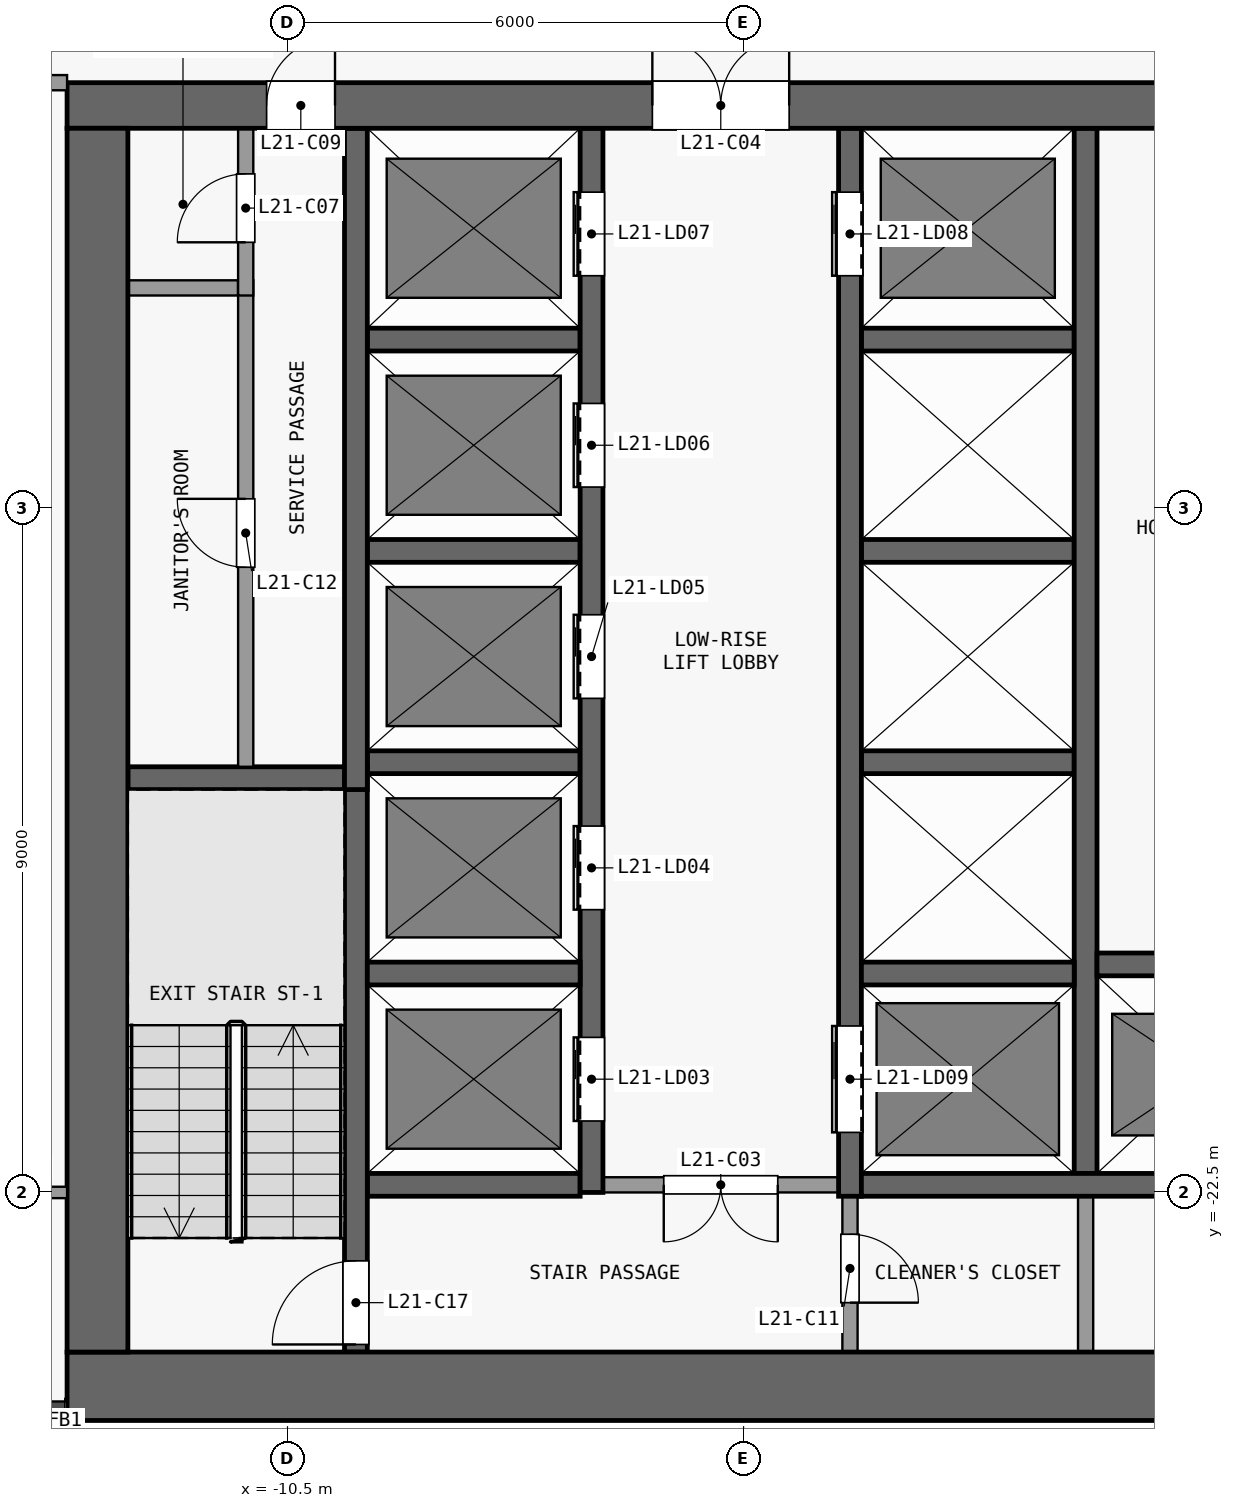
"""IFC4 building model, lengths in metres.
Left out: names, types, materials, properties, quantities, classifications, styles, units other than length and angle.
Written with IfcOpenShell. Run it as: python <this file> out.ifc"""

import sys

from ifc_helpers import new_model, si_unit, direction, frame, frame_2d, origin, place, context, subcontext, project, spatial, rectangle, extrude, element, fill, save


model = new_model("IFC4")
c1 = context("Model", 3, precision=1e-05, world=origin(), true_north=direction((0.0, 1.0)))
c2 = subcontext(c1, "Body", "Model", "MODEL_VIEW")
j1 = project(units=[si_unit("LENGTHUNIT", "METRE"), si_unit("PLANEANGLEUNIT", "RADIAN")], contexts=[c1])
p1 = place(None, origin())
s1 = spatial("IfcSite", under=j1, at=p1, CompositionType="ELEMENT")
p2 = place(p1, origin())
s2 = spatial("IfcBuilding", under=s1, at=p2, CompositionType="ELEMENT")
p3 = place(p2, frame((0.0, 0.0, 88.3)))
s3 = spatial("IfcBuildingStorey", under=s2, at=p3, CompositionType="ELEMENT", Elevation=88.3)
p4 = place(p3, frame((-13.4, -25.05, 0.0), z_axis=(0.0, 0.0, 1.0), x_axis=(1.0, 0.0, 0.0)))
e1 = element("IfcWall", 1, at=p4, inside=s3, PredefinedType="SHEAR", context=c2, shape_type="SweptSolid", body=[
    extrude(rectangle(XDim=26.8, YDim=0.9, at=frame_2d((13.4, 0.0))), origin(), (0.0, 0.0, 1.0), 3.3),
])
p5 = place(p3, frame((-13.4, -8.2, 0.0), z_axis=(0.0, 0.0, 1.0), x_axis=(1.0, 0.0, 0.0)))
e2 = element("IfcWall", 2, at=p5, inside=s3, PredefinedType="SHEAR", context=c2, shape_type="SweptSolid", body=[
    extrude(rectangle(XDim=26.8, YDim=0.6, at=frame_2d((13.4, 0.0))), origin(), (0.0, 0.0, 1.0), 3.3),
])
p6 = place(p5, frame((7.7, 0.0, 0.0)))
e3 = element("IfcOpeningElement", 3, at=p6, cuts=e2, PredefinedType="OPENING", context=c2, shape_type="SweptSolid", body=[
    extrude(rectangle(XDim=1.8, YDim=2.1, at=frame_2d((0.9, 1.05))), frame((0.0, 0.31, 0.0), z_axis=(0.0, -1.0, 0.0), x_axis=(1.0, 0.0, 0.0)), (0.0, 0.0, 1.0), 0.62),
])
p7 = place(p5, frame((17.3, 0.0, 0.0)))
e4 = element("IfcOpeningElement", 4, at=p7, cuts=e2, PredefinedType="OPENING", context=c2, shape_type="SweptSolid", body=[
    extrude(rectangle(XDim=1.8, YDim=2.1, at=frame_2d((0.9, 1.05))), frame((0.0, 0.31, 0.0), z_axis=(0.0, -1.0, 0.0), x_axis=(1.0, 0.0, 0.0)), (0.0, 0.0, 1.0), 0.62),
])
p8 = place(p5, frame((2.625, 0.0, 0.0)))
e5 = element("IfcOpeningElement", 5, at=p8, cuts=e2, PredefinedType="OPENING", context=c2, shape_type="SweptSolid", body=[
    extrude(rectangle(XDim=0.9, YDim=2.1, at=frame_2d((0.45, 1.05))), frame((0.0, 0.31, 0.0), z_axis=(0.0, -1.0, 0.0), x_axis=(1.0, 0.0, 0.0)), (0.0, 0.0, 1.0), 0.62),
])
p9 = place(p5, frame((23.275, 0.0, 0.0)))
e6 = element("IfcOpeningElement", 6, at=p9, cuts=e2, PredefinedType="OPENING", context=c2, shape_type="SweptSolid", body=[
    extrude(rectangle(XDim=0.9, YDim=2.1, at=frame_2d((0.45, 1.05))), frame((0.0, 0.31, 0.0), z_axis=(0.0, -1.0, 0.0), x_axis=(1.0, 0.0, 0.0)), (0.0, 0.0, 1.0), 0.62),
])
p10 = place(p3, frame((-13.0, -24.6, 0.0), z_axis=(0.0, 0.0, 1.0), x_axis=(0.0, 1.0, 0.0)))
e7 = element("IfcWall", 7, at=p10, inside=s3, PredefinedType="SHEAR", context=c2, shape_type="SweptSolid", body=[
    extrude(rectangle(XDim=16.1, YDim=0.8, at=frame_2d((8.05, 0.0))), origin(), (0.0, 0.0, 1.0), 3.3),
])
p11 = place(p3, frame((-9.45, -22.4, 0.0), z_axis=(0.0, 0.0, 1.0), x_axis=(1.0, 0.0, 0.0)))
e8 = element("IfcWall", 8, at=p11, inside=s3, PredefinedType="SHEAR", context=c2, shape_type="SweptSolid", body=[
    extrude(rectangle(XDim=2.8, YDim=0.3, at=frame_2d((1.4, 0.0))), origin(), (0.0, 0.0, 1.0), 3.3),
])
p12 = place(p3, frame((-3.25, -22.4, 0.0), z_axis=(0.0, 0.0, 1.0), x_axis=(-1.0, 0.0, 0.0)))
e9 = element("IfcWall", 9, at=p12, inside=s3, PredefinedType="PARTITIONING", context=c2, shape_type="SweptSolid", body=[
    extrude(rectangle(XDim=3.1, YDim=0.2, at=frame_2d((1.55, 0.0))), origin(), (0.0, 0.0, 1.0), 3.3),
])
p13 = place(p12, frame((0.8, 0.0, 0.0)))
e10 = element("IfcOpeningElement", 10, at=p13, cuts=e9, PredefinedType="OPENING", context=c2, shape_type="SweptSolid", body=[
    extrude(rectangle(XDim=1.5, YDim=2.1, at=frame_2d((0.75, 1.05))), frame((0.0, 0.11, 0.0), z_axis=(0.0, -1.0, 0.0), x_axis=(1.0, 0.0, 0.0)), (0.0, 0.0, 1.0), 0.22),
])
p14 = place(p3, frame((-2.95, -22.4, 0.0), z_axis=(0.0, 0.0, 1.0), x_axis=(1.0, 0.0, 0.0)))
e11 = element("IfcWall", 11, at=p14, inside=s3, PredefinedType="SHEAR", context=c2, shape_type="SweptSolid", body=[
    extrude(rectangle(XDim=6.2, YDim=0.3, at=frame_2d((3.1, 0.0))), origin(), (0.0, 0.0, 1.0), 3.3),
])
for number, where, z_axis, x_axis in (
    (12, (-9.45, -19.62, 0.0), (0.0, 0.0, 1.0), (1.0, 0.0, 0.0)),
    (13, (-2.95, -19.62, 0.0), (0.0, 0.0, 1.0), (1.0, 0.0, 0.0)),
):
    element("IfcWall", number, at=place(p3, frame(where, z_axis=z_axis, x_axis=x_axis)), inside=s3, PredefinedType="SHEAR", context=c2, shape_type="SweptSolid", body=[
        extrude(rectangle(XDim=2.8, YDim=0.3, at=frame_2d((1.4, 0.0))), origin(), (0.0, 0.0, 1.0), 3.3),
    ])
p15 = place(p3, frame((0.15, -19.5, 0.0), z_axis=(0.0, 0.0, 1.0), x_axis=(1.0, 0.0, 0.0)))
e14 = element("IfcWall", 14, at=p15, inside=s3, PredefinedType="SHEAR", context=c2, shape_type="SweptSolid", body=[
    extrude(rectangle(XDim=3.025, YDim=0.3, at=frame_2d((1.513, 0.0))), origin(), (0.0, 0.0, 1.0), 3.3),
])
p16 = place(p3, frame((-12.6, -17.05, 0.0), z_axis=(0.0, 0.0, 1.0), x_axis=(1.0, 0.0, 0.0)))
e15 = element("IfcWall", 15, at=p16, inside=s3, PredefinedType="SHEAR", context=c2, shape_type="SweptSolid", body=[
    extrude(rectangle(XDim=2.85, YDim=0.3, at=frame_2d((1.425, 0.0))), origin(), (0.0, 0.0, 1.0), 3.3),
])
for number, where, z_axis, x_axis in (
    (16, (-9.45, -16.84, 0.0), (0.0, 0.0, 1.0), (1.0, 0.0, 0.0)),
    (17, (-2.95, -16.84, 0.0), (0.0, 0.0, 1.0), (1.0, 0.0, 0.0)),
    (18, (-9.45, -14.06, 0.0), (0.0, 0.0, 1.0), (1.0, 0.0, 0.0)),
    (19, (-2.95, -14.06, 0.0), (0.0, 0.0, 1.0), (1.0, 0.0, 0.0)),
    (20, (-9.45, -11.28, 0.0), (0.0, 0.0, 1.0), (1.0, 0.0, 0.0)),
    (21, (-2.95, -11.28, 0.0), (0.0, 0.0, 1.0), (1.0, 0.0, 0.0)),
):
    element("IfcWall", number, at=place(p3, frame(where, z_axis=z_axis, x_axis=x_axis)), inside=s3, PredefinedType="SHEAR", context=c2, shape_type="SweptSolid", body=[
        extrude(rectangle(XDim=2.8, YDim=0.3, at=frame_2d((1.4, 0.0))), origin(), (0.0, 0.0, 1.0), 3.3),
    ])
p17 = place(p3, frame((-12.6, -10.6, 0.0), z_axis=(0.0, 0.0, 1.0), x_axis=(1.0, 0.0, 0.0)))
e22 = element("IfcWall", 22, at=p17, inside=s3, PredefinedType="PARTITIONING", context=c2, shape_type="SweptSolid", body=[
    extrude(rectangle(XDim=1.45, YDim=0.2, at=frame_2d((0.725, 0.0))), origin(), (0.0, 0.0, 1.0), 3.3),
])
p18 = place(p3, frame((-11.05, -16.9, 0.0), z_axis=(0.0, 0.0, 1.0), x_axis=(0.0, 1.0, 0.0)))
e23 = element("IfcWall", 23, at=p18, inside=s3, PredefinedType="PARTITIONING", context=c2, shape_type="SweptSolid", body=[
    extrude(rectangle(XDim=6.4, YDim=0.2, at=frame_2d((3.2, 0.0))), origin(), (0.0, 0.0, 1.0), 3.3),
])
p19 = place(p18, frame((2.625, 0.0, 0.0)))
e24 = element("IfcOpeningElement", 24, at=p19, cuts=e23, PredefinedType="OPENING", context=c2, shape_type="SweptSolid", body=[
    extrude(rectangle(XDim=0.9, YDim=2.1, at=frame_2d((0.45, 1.05))), frame((0.0, 0.11, 0.0), z_axis=(0.0, -1.0, 0.0), x_axis=(1.0, 0.0, 0.0)), (0.0, 0.0, 1.0), 0.22),
])
p20 = place(p3, frame((-11.05, -10.7, 0.0), z_axis=(0.0, 0.0, 1.0), x_axis=(0.0, 1.0, 0.0)))
e25 = element("IfcWall", 25, at=p20, inside=s3, PredefinedType="PARTITIONING", context=c2, shape_type="SweptSolid", body=[
    extrude(rectangle(XDim=2.2, YDim=0.2, at=frame_2d((1.1, 0.0))), origin(), (0.0, 0.0, 1.0), 3.3),
])
p21 = place(p20, frame((0.7, 0.0, 0.0)))
e26 = element("IfcOpeningElement", 26, at=p21, cuts=e25, PredefinedType="OPENING", context=c2, shape_type="SweptSolid", body=[
    extrude(rectangle(XDim=0.9, YDim=2.1, at=frame_2d((0.45, 1.05))), frame((0.0, 0.11, 0.0), z_axis=(0.0, -1.0, 0.0), x_axis=(1.0, 0.0, 0.0)), (0.0, 0.0, 1.0), 0.22),
])
p22 = place(p3, frame((-9.6, -24.6, 0.0), z_axis=(0.0, 0.0, 1.0), x_axis=(0.0, 1.0, 0.0)))
e27 = element("IfcWall", 27, at=p22, inside=s3, PredefinedType="SHEAR", context=c2, shape_type="SweptSolid", body=[
    extrude(rectangle(XDim=7.7, YDim=0.3, at=frame_2d((3.85, 0.0))), origin(), (0.0, 0.0, 1.0), 3.3),
])
p23 = place(p22, frame((0.1, 0.0, 0.0)))
e28 = element("IfcOpeningElement", 28, at=p23, cuts=e27, PredefinedType="OPENING", context=c2, shape_type="SweptSolid", body=[
    extrude(rectangle(XDim=1.1, YDim=2.1, at=frame_2d((0.55, 1.05))), frame((0.0, 0.16, 0.0), z_axis=(0.0, -1.0, 0.0), x_axis=(1.0, 0.0, 0.0)), (0.0, 0.0, 1.0), 0.32),
])
p24 = place(p3, frame((-9.6, -17.2, 0.0), z_axis=(0.0, 0.0, 1.0), x_axis=(0.0, 1.0, 0.0)))
e29 = element("IfcWall", 29, at=p24, inside=s3, PredefinedType="SHEAR", context=c2, shape_type="SweptSolid", body=[
    extrude(rectangle(XDim=8.7, YDim=0.3, at=frame_2d((4.35, 0.0))), origin(), (0.0, 0.0, 1.0), 3.3),
])
p25 = place(p3, frame((-6.5, -22.5, 0.0), z_axis=(0.0, 0.0, 1.0), x_axis=(0.0, 1.0, 0.0)))
e30 = element("IfcWall", 30, at=p25, inside=s3, PredefinedType="SHEAR", context=c2, shape_type="SweptSolid", body=[
    extrude(rectangle(XDim=14.0, YDim=0.3, at=frame_2d((7.0, 0.0))), origin(), (0.0, 0.0, 1.0), 3.3),
])
p26 = place(p25, frame((0.94, 0.0, 0.0)))
e31 = element("IfcOpeningElement", 31, at=p26, cuts=e30, PredefinedType="OPENING", context=c2, shape_type="SweptSolid", body=[
    extrude(rectangle(XDim=1.1, YDim=2.1, at=frame_2d((0.55, 1.05))), frame((0.0, 0.16, 0.0), z_axis=(0.0, -1.0, 0.0), x_axis=(1.0, 0.0, 0.0)), (0.0, 0.0, 1.0), 0.32),
])
p27 = place(p25, frame((3.72, 0.0, 0.0)))
e32 = element("IfcOpeningElement", 32, at=p27, cuts=e30, PredefinedType="OPENING", context=c2, shape_type="SweptSolid", body=[
    extrude(rectangle(XDim=1.1, YDim=2.1, at=frame_2d((0.55, 1.05))), frame((0.0, 0.16, 0.0), z_axis=(0.0, -1.0, 0.0), x_axis=(1.0, 0.0, 0.0)), (0.0, 0.0, 1.0), 0.32),
])
p28 = place(p25, frame((6.5, 0.0, 0.0)))
e33 = element("IfcOpeningElement", 33, at=p28, cuts=e30, PredefinedType="OPENING", context=c2, shape_type="SweptSolid", body=[
    extrude(rectangle(XDim=1.1, YDim=2.1, at=frame_2d((0.55, 1.05))), frame((0.0, 0.16, 0.0), z_axis=(0.0, -1.0, 0.0), x_axis=(1.0, 0.0, 0.0)), (0.0, 0.0, 1.0), 0.32),
])
p29 = place(p25, frame((9.28, 0.0, 0.0)))
e34 = element("IfcOpeningElement", 34, at=p29, cuts=e30, PredefinedType="OPENING", context=c2, shape_type="SweptSolid", body=[
    extrude(rectangle(XDim=1.1, YDim=2.1, at=frame_2d((0.55, 1.05))), frame((0.0, 0.16, 0.0), z_axis=(0.0, -1.0, 0.0), x_axis=(1.0, 0.0, 0.0)), (0.0, 0.0, 1.0), 0.32),
])
p30 = place(p25, frame((12.06, 0.0, 0.0)))
e35 = element("IfcOpeningElement", 35, at=p30, cuts=e30, PredefinedType="OPENING", context=c2, shape_type="SweptSolid", body=[
    extrude(rectangle(XDim=1.1, YDim=2.1, at=frame_2d((0.55, 1.05))), frame((0.0, 0.16, 0.0), z_axis=(0.0, -1.0, 0.0), x_axis=(1.0, 0.0, 0.0)), (0.0, 0.0, 1.0), 0.32),
])
p31 = place(p3, frame((-3.1, -22.55, 0.0), z_axis=(0.0, 0.0, 1.0), x_axis=(0.0, -1.0, 0.0)))
e36 = element("IfcWall", 36, at=p31, inside=s3, PredefinedType="PARTITIONING", context=c2, shape_type="SweptSolid", body=[
    extrude(rectangle(XDim=2.05, YDim=0.2, at=frame_2d((1.025, 0.0))), origin(), (0.0, 0.0, 1.0), 3.3),
])
p32 = place(p31, frame((0.5, 0.0, 0.0)))
e37 = element("IfcOpeningElement", 37, at=p32, cuts=e36, PredefinedType="OPENING", context=c2, shape_type="SweptSolid", body=[
    extrude(rectangle(XDim=0.9, YDim=2.1, at=frame_2d((0.45, 1.05))), frame((0.0, 0.11, 0.0), z_axis=(0.0, -1.0, 0.0), x_axis=(1.0, 0.0, 0.0)), (0.0, 0.0, 1.0), 0.22),
])
p33 = place(p3, frame((-3.1, -22.55, 0.0), z_axis=(0.0, 0.0, 1.0), x_axis=(0.0, 1.0, 0.0)))
e38 = element("IfcWall", 38, at=p33, inside=s3, PredefinedType="SHEAR", context=c2, shape_type="SweptSolid", body=[
    extrude(rectangle(XDim=14.05, YDim=0.3, at=frame_2d((7.025, 0.0))), origin(), (0.0, 0.0, 1.0), 3.3),
])
p34 = place(p33, frame((12.11, 0.0, 0.0)))
e39 = element("IfcOpeningElement", 39, at=p34, cuts=e38, PredefinedType="OPENING", context=c2, shape_type="SweptSolid", body=[
    extrude(rectangle(XDim=1.1, YDim=2.1, at=frame_2d((0.55, 1.05))), frame((0.0, 0.16, 0.0), z_axis=(0.0, -1.0, 0.0), x_axis=(1.0, 0.0, 0.0)), (0.0, 0.0, 1.0), 0.32),
])
p35 = place(p33, frame((0.84, 0.0, 0.0)))
e40 = element("IfcOpeningElement", 40, at=p35, cuts=e38, PredefinedType="OPENING", context=c2, shape_type="SweptSolid", body=[
    extrude(rectangle(XDim=1.4, YDim=2.1, at=frame_2d((0.7, 1.05))), frame((0.0, 0.16, 0.0), z_axis=(0.0, -1.0, 0.0), x_axis=(1.0, 0.0, 0.0)), (0.0, 0.0, 1.0), 0.32),
])
p36 = place(p3, frame((0.0, -24.6, 0.0), z_axis=(0.0, 0.0, 1.0), x_axis=(0.0, 1.0, 0.0)))
e41 = element("IfcWall", 41, at=p36, inside=s3, PredefinedType="PARTITIONING", context=c2, shape_type="SweptSolid", body=[
    extrude(rectangle(XDim=2.05, YDim=0.2, at=frame_2d((1.025, 0.0))), origin(), (0.0, 0.0, 1.0), 3.3),
])
p37 = place(p3, frame((0.0, -22.25, 0.0), z_axis=(0.0, 0.0, 1.0), x_axis=(0.0, 1.0, 0.0)))
e42 = element("IfcWall", 42, at=p37, inside=s3, PredefinedType="SHEAR", context=c2, shape_type="SweptSolid", body=[
    extrude(rectangle(XDim=13.75, YDim=0.3, at=frame_2d((6.875, 0.0))), origin(), (0.0, 0.0, 1.0), 3.3),
])
p38 = place(p3, frame((-16.325, -22.5, 0.0), z_axis=(0.0, 0.0, 1.0), x_axis=(1.0, 0.0, 0.0)))
e43 = element("IfcWall", 43, at=p38, inside=s3, PredefinedType="PARTITIONING", context=c2, shape_type="SweptSolid", body=[
    extrude(rectangle(XDim=2.925, YDim=0.15, at=frame_2d((1.462, 0.0))), origin(), (0.0, 0.0, 1.0), 3.3),
])
p39 = place(p38, frame((1.0, 0.0, 0.0)))
e44 = element("IfcOpeningElement", 44, at=p39, cuts=e43, PredefinedType="OPENING", context=c2, shape_type="SweptSolid", body=[
    extrude(rectangle(XDim=0.9, YDim=2.1, at=frame_2d((0.45, 1.05))), frame((0.0, 0.085, 0.0), z_axis=(0.0, -1.0, 0.0), x_axis=(1.0, 0.0, 0.0)), (0.0, 0.0, 1.0), 0.17),
])
p40 = place(p3, frame((-23.85, -7.9, 0.0), z_axis=(0.0, 0.0, 1.0), x_axis=(1.0, 0.0, 0.0)))
e45 = element("IfcWall", 45, at=p40, inside=s3, PredefinedType="PARTITIONING", context=c2, shape_type="SweptSolid", body=[
    extrude(rectangle(XDim=10.45, YDim=0.2, at=frame_2d((5.225, 0.0))), origin(), (0.0, 0.0, 1.0), 3.3),
])
p41 = place(p40, frame((8.45, 0.0, 0.0)))
e46 = element("IfcOpeningElement", 46, at=p41, cuts=e45, PredefinedType="OPENING", context=c2, shape_type="SweptSolid", body=[
    extrude(rectangle(XDim=1.0, YDim=2.1, at=frame_2d((0.5, 1.05))), frame((0.0, 0.11, 0.0), z_axis=(0.0, -1.0, 0.0), x_axis=(1.0, 0.0, 0.0)), (0.0, 0.0, 1.0), 0.22),
])
p42 = place(p26, origin())
e47 = element("IfcDoor", 47, at=p42, inside=s3, OperationType="DOUBLE_DOOR_SLIDING", PredefinedType="DOOR", context=c2, shape_type="SweptSolid", body=[
    extrude(rectangle(XDim=1.1, YDim=2.1, at=frame_2d((0.55, 1.05))), frame((0.0, 0.025, 0.0), z_axis=(0.0, -1.0, 0.0), x_axis=(1.0, 0.0, 0.0)), (0.0, 0.0, 1.0), 0.05),
])
fill(e31, e47)
p43 = place(p27, origin())
e48 = element("IfcDoor", 48, at=p43, inside=s3, OperationType="DOUBLE_DOOR_SLIDING", PredefinedType="DOOR", context=c2, shape_type="SweptSolid", body=[
    extrude(rectangle(XDim=1.1, YDim=2.1, at=frame_2d((0.55, 1.05))), frame((0.0, 0.025, 0.0), z_axis=(0.0, -1.0, 0.0), x_axis=(1.0, 0.0, 0.0)), (0.0, 0.0, 1.0), 0.05),
])
fill(e32, e48)
p44 = place(p28, origin())
e49 = element("IfcDoor", 49, at=p44, inside=s3, OperationType="DOUBLE_DOOR_SLIDING", PredefinedType="DOOR", context=c2, shape_type="SweptSolid", body=[
    extrude(rectangle(XDim=1.1, YDim=2.1, at=frame_2d((0.55, 1.05))), frame((0.0, 0.025, 0.0), z_axis=(0.0, -1.0, 0.0), x_axis=(1.0, 0.0, 0.0)), (0.0, 0.0, 1.0), 0.05),
])
fill(e33, e49)
p45 = place(p29, origin())
e50 = element("IfcDoor", 50, at=p45, inside=s3, OperationType="DOUBLE_DOOR_SLIDING", PredefinedType="DOOR", context=c2, shape_type="SweptSolid", body=[
    extrude(rectangle(XDim=1.1, YDim=2.1, at=frame_2d((0.55, 1.05))), frame((0.0, 0.025, 0.0), z_axis=(0.0, -1.0, 0.0), x_axis=(1.0, 0.0, 0.0)), (0.0, 0.0, 1.0), 0.05),
])
fill(e34, e50)
p46 = place(p30, origin())
e51 = element("IfcDoor", 51, at=p46, inside=s3, OperationType="DOUBLE_DOOR_SLIDING", PredefinedType="DOOR", context=c2, shape_type="SweptSolid", body=[
    extrude(rectangle(XDim=1.1, YDim=2.1, at=frame_2d((0.55, 1.05))), frame((0.0, 0.025, 0.0), z_axis=(0.0, -1.0, 0.0), x_axis=(1.0, 0.0, 0.0)), (0.0, 0.0, 1.0), 0.05),
])
fill(e35, e51)
p47 = place(p34, origin())
e52 = element("IfcDoor", 52, at=p47, inside=s3, OperationType="DOUBLE_DOOR_SLIDING", PredefinedType="DOOR", context=c2, shape_type="SweptSolid", body=[
    extrude(rectangle(XDim=1.1, YDim=2.1, at=frame_2d((0.55, 1.05))), frame((0.0, 0.025, 0.0), z_axis=(0.0, -1.0, 0.0), x_axis=(1.0, 0.0, 0.0)), (0.0, 0.0, 1.0), 0.05),
])
fill(e39, e52)
p48 = place(p35, origin())
e53 = element("IfcDoor", 53, at=p48, inside=s3, OperationType="DOUBLE_DOOR_SLIDING", PredefinedType="DOOR", context=c2, shape_type="SweptSolid", body=[
    extrude(rectangle(XDim=1.4, YDim=2.1, at=frame_2d((0.7, 1.05))), frame((0.0, 0.025, 0.0), z_axis=(0.0, -1.0, 0.0), x_axis=(1.0, 0.0, 0.0)), (0.0, 0.0, 1.0), 0.05),
])
fill(e40, e53)
p49 = place(p13, origin())
e54 = element("IfcDoor", 54, at=p49, inside=s3, OperationType="DOUBLE_DOOR_SINGLE_SWING", PredefinedType="DOOR", context=c2, shape_type="SweptSolid", body=[
    extrude(rectangle(XDim=1.5, YDim=2.1, at=frame_2d((0.75, 1.05))), frame((0.0, 0.025, 0.0), z_axis=(0.0, -1.0, 0.0), x_axis=(1.0, 0.0, 0.0)), (0.0, 0.0, 1.0), 0.05),
])
fill(e10, e54)
p50 = place(p6, origin())
e55 = element("IfcDoor", 55, at=p50, inside=s3, OperationType="DOUBLE_DOOR_SINGLE_SWING", PredefinedType="DOOR", context=c2, shape_type="SweptSolid", body=[
    extrude(rectangle(XDim=1.8, YDim=2.1, at=frame_2d((0.9, 1.05))), frame((0.0, 0.025, 0.0), z_axis=(0.0, -1.0, 0.0), x_axis=(1.0, 0.0, 0.0)), (0.0, 0.0, 1.0), 0.05),
])
fill(e3, e55)
p51 = place(p21, origin())
e56 = element("IfcDoor", 56, at=p51, inside=s3, OperationType="SINGLE_SWING_LEFT", PredefinedType="DOOR", context=c2, shape_type="SweptSolid", body=[
    extrude(rectangle(XDim=0.9, YDim=2.1, at=frame_2d((0.45, 1.05))), frame((0.0, 0.025, 0.0), z_axis=(0.0, -1.0, 0.0), x_axis=(1.0, 0.0, 0.0)), (0.0, 0.0, 1.0), 0.05),
])
fill(e26, e56)
p52 = place(p8, origin())
e57 = element("IfcDoor", 57, at=p52, inside=s3, OperationType="SINGLE_SWING_RIGHT", PredefinedType="DOOR", context=c2, shape_type="SweptSolid", body=[
    extrude(rectangle(XDim=0.9, YDim=2.1, at=frame_2d((0.45, 1.05))), frame((0.0, 0.025, 0.0), z_axis=(0.0, -1.0, 0.0), x_axis=(1.0, 0.0, 0.0)), (0.0, 0.0, 1.0), 0.05),
])
fill(e5, e57)
p53 = place(p32, origin())
e58 = element("IfcDoor", 58, at=p53, inside=s3, OperationType="SINGLE_SWING_RIGHT", PredefinedType="DOOR", context=c2, shape_type="SweptSolid", body=[
    extrude(rectangle(XDim=0.9, YDim=2.1, at=frame_2d((0.45, 1.05))), frame((0.0, 0.025, 0.0), z_axis=(0.0, -1.0, 0.0), x_axis=(1.0, 0.0, 0.0)), (0.0, 0.0, 1.0), 0.05),
])
fill(e37, e58)
p54 = place(p19, origin())
e59 = element("IfcDoor", 59, at=p54, inside=s3, OperationType="SINGLE_SWING_RIGHT", PredefinedType="DOOR", context=c2, shape_type="SweptSolid", body=[
    extrude(rectangle(XDim=0.9, YDim=2.1, at=frame_2d((0.45, 1.05))), frame((0.0, 0.025, 0.0), z_axis=(0.0, -1.0, 0.0), x_axis=(1.0, 0.0, 0.0)), (0.0, 0.0, 1.0), 0.05),
])
fill(e24, e59)
p55 = place(p23, origin())
e60 = element("IfcDoor", 60, at=p55, inside=s3, OperationType="SINGLE_SWING_LEFT", PredefinedType="DOOR", context=c2, shape_type="SweptSolid", body=[
    extrude(rectangle(XDim=1.1, YDim=2.1, at=frame_2d((0.55, 1.05))), frame((0.0, 0.025, 0.0), z_axis=(0.0, -1.0, 0.0), x_axis=(1.0, 0.0, 0.0)), (0.0, 0.0, 1.0), 0.05),
])
fill(e28, e60)
save(model, sys.argv[1])
